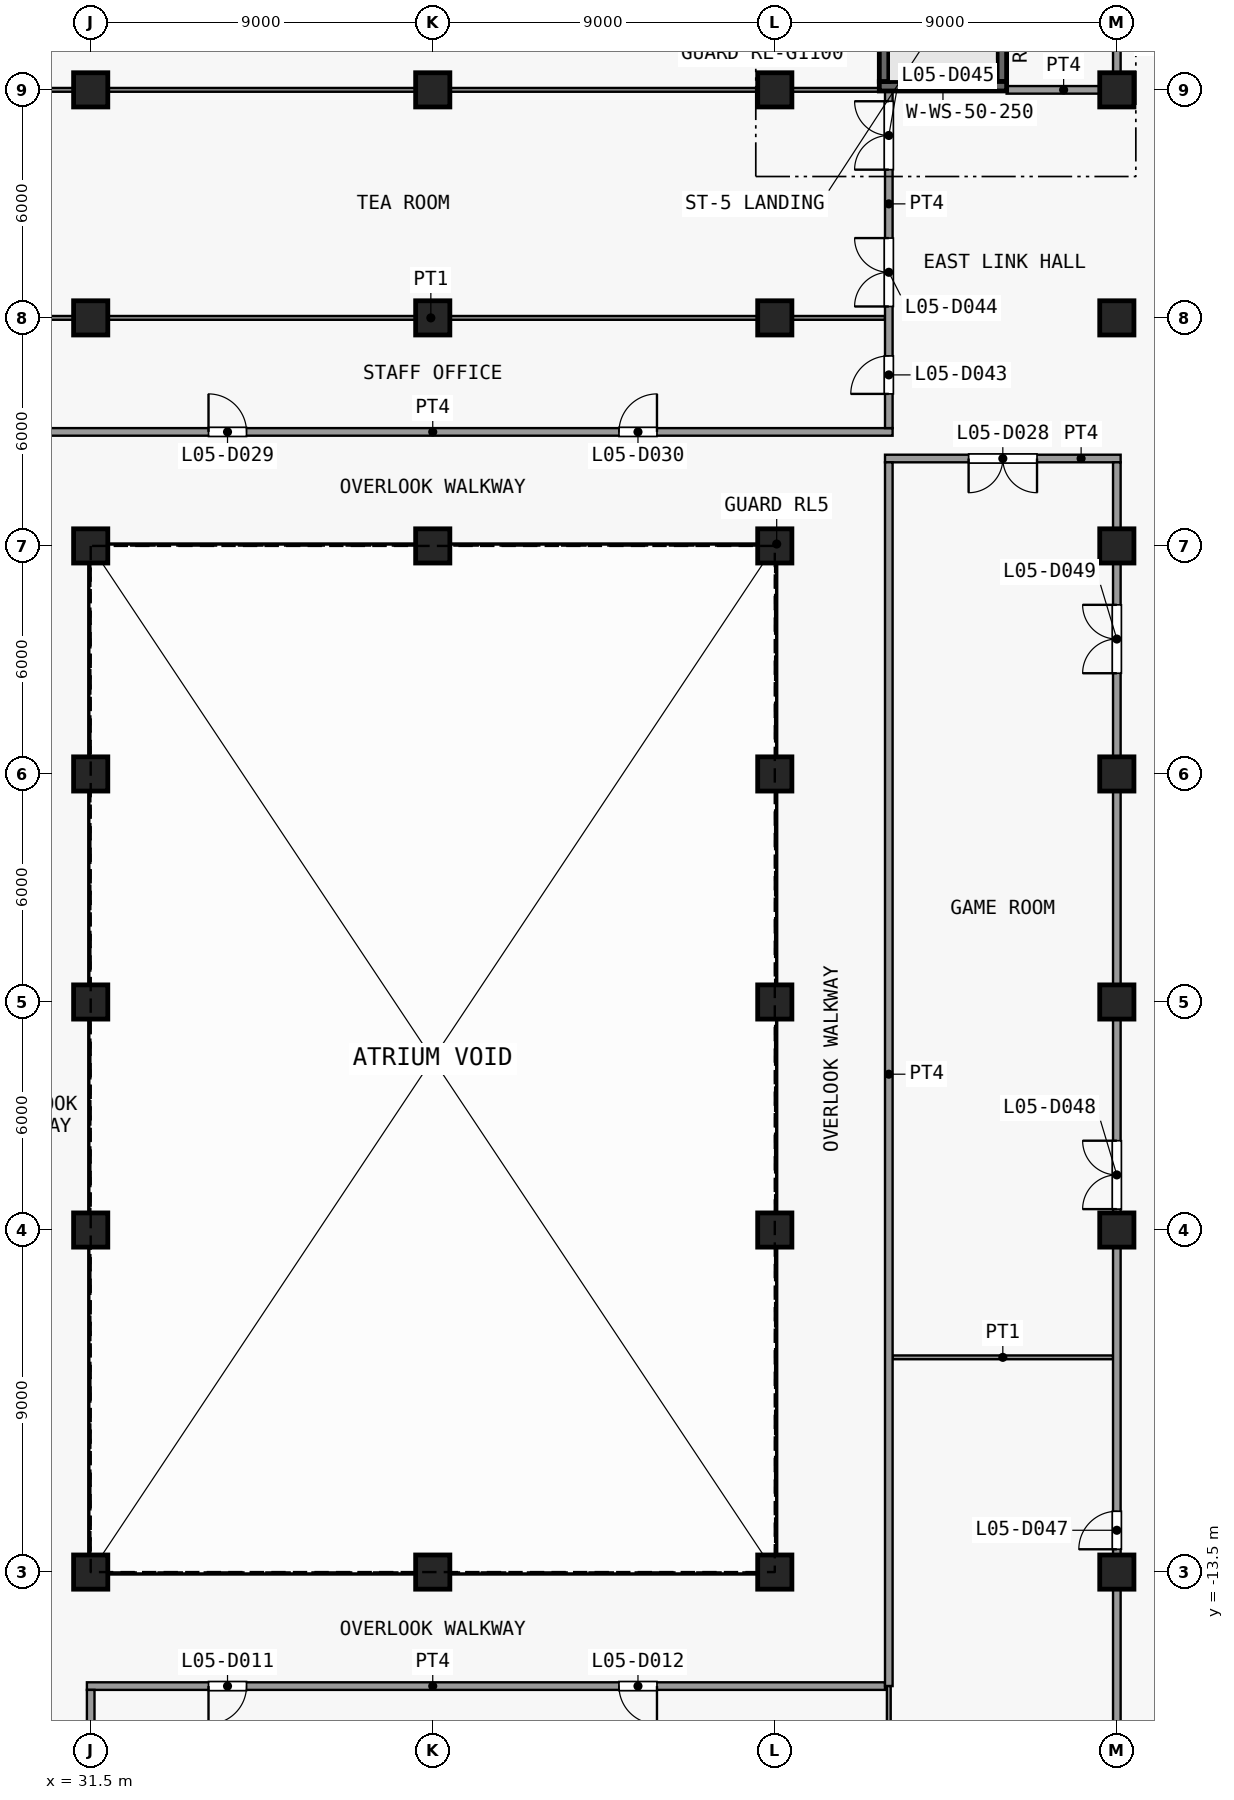
"""IFC4 building model, lengths in metres.
Left out: names, types, materials, properties, quantities, classifications, styles, units other than length and angle.
Written with IfcOpenShell. Run it as: python <this file> out.ifc"""

import sys

from ifc_helpers import new_model, si_unit, direction, frame, frame_2d, origin, origin_2d, place, context, subcontext, project, spatial, rectangle, extrude, element, fill, save


model = new_model("IFC4")
c1 = context("Model", 3, precision=1e-05, world=origin(), true_north=direction((0.0, 1.0)))
c2 = subcontext(c1, "Body", "Model", "MODEL_VIEW")
j1 = project(units=[si_unit("LENGTHUNIT", "METRE"), si_unit("PLANEANGLEUNIT", "RADIAN")], contexts=[c1])
p1 = place(None, origin())
s1 = spatial("IfcSite", under=j1, at=p1, CompositionType="ELEMENT")
p2 = place(p1, origin())
s2 = spatial("IfcBuilding", under=s1, at=p2, CompositionType="ELEMENT")
p3 = place(p2, frame((0.0, 0.0, 28.0)))
s3 = spatial("IfcBuildingStorey", under=s2, at=p3, CompositionType="ELEMENT", Elevation=28.0)
for number, where, z_axis, x_axis in (
    (1, (31.5, -13.5, 0.0), (0.0, 0.0, 1.0), (1.0, 0.0, 0.0)),
    (2, (31.5, -4.5, 0.0), (0.0, 0.0, 1.0), (1.0, 0.0, 0.0)),
    (3, (31.5, 1.5, 0.0), (0.0, 0.0, 1.0), (1.0, 0.0, 0.0)),
    (4, (31.5, 7.5, 0.0), (0.0, 0.0, 1.0), (1.0, 0.0, 0.0)),
    (5, (31.5, 13.5, 0.0), (0.0, 0.0, 1.0), (1.0, 0.0, 0.0)),
    (6, (31.5, 19.5, 0.0), (0.0, 0.0, 1.0), (1.0, 0.0, 0.0)),
    (7, (31.5, 25.5, 0.0), (0.0, 0.0, 1.0), (1.0, 0.0, 0.0)),
    (8, (40.5, -13.5, 0.0), (0.0, 0.0, 1.0), (1.0, 0.0, 0.0)),
    (9, (40.5, 13.5, 0.0), (0.0, 0.0, 1.0), (1.0, 0.0, 0.0)),
    (10, (40.5, 19.5, 0.0), (0.0, 0.0, 1.0), (1.0, 0.0, 0.0)),
    (11, (40.5, 25.5, 0.0), (0.0, 0.0, 1.0), (1.0, 0.0, 0.0)),
    (12, (49.5, -13.5, 0.0), (0.0, 0.0, 1.0), (1.0, 0.0, 0.0)),
    (13, (49.5, -4.5, 0.0), (0.0, 0.0, 1.0), (1.0, 0.0, 0.0)),
    (14, (49.5, 1.5, 0.0), (0.0, 0.0, 1.0), (1.0, 0.0, 0.0)),
    (15, (49.5, 7.5, 0.0), (0.0, 0.0, 1.0), (1.0, 0.0, 0.0)),
    (16, (49.5, 13.5, 0.0), (0.0, 0.0, 1.0), (1.0, 0.0, 0.0)),
    (17, (49.5, 19.5, 0.0), (0.0, 0.0, 1.0), (1.0, 0.0, 0.0)),
    (18, (49.5, 25.5, 0.0), (0.0, 0.0, 1.0), (1.0, 0.0, 0.0)),
    (19, (58.5, -13.5, 0.0), (0.0, 0.0, 1.0), (1.0, 0.0, 0.0)),
    (20, (58.5, -4.5, 0.0), (0.0, 0.0, 1.0), (1.0, 0.0, 0.0)),
    (21, (58.5, 1.5, 0.0), (0.0, 0.0, 1.0), (1.0, 0.0, 0.0)),
    (22, (58.5, 7.5, 0.0), (0.0, 0.0, 1.0), (1.0, 0.0, 0.0)),
    (23, (58.5, 13.5, 0.0), (0.0, 0.0, 1.0), (1.0, 0.0, 0.0)),
    (24, (58.5, 19.5, 0.0), (0.0, 0.0, 1.0), (1.0, 0.0, 0.0)),
    (25, (58.5, 25.5, 0.0), (0.0, 0.0, 1.0), (1.0, 0.0, 0.0)),
):
    element("IfcColumn", number, at=place(p3, frame(where, z_axis=z_axis, x_axis=x_axis)), inside=s3, PredefinedType="COLUMN", context=c2, shape_type="SweptSolid", body=[
        extrude(rectangle(XDim=0.9, YDim=0.9, at=origin_2d()), origin(), (0.0, 0.0, 1.0), 4.5),
    ])
for number, where, z_axis, x_axis in (
    (26, (52.375, 25.72, 0.0), (0.0, 0.0, 1.0), (0.0, 1.0, 0.0)),
    (27, (55.475, 25.72, 0.0), (0.0, 0.0, 1.0), (0.0, 1.0, 0.0)),
):
    element("IfcWall", number, at=place(p3, frame(where, z_axis=z_axis, x_axis=x_axis)), inside=s3, PredefinedType="SHEAR", context=c2, shape_type="SweptSolid", body=[
        extrude(rectangle(XDim=1.35, YDim=0.25, at=frame_2d((0.675, 0.0))), origin(), (0.0, 0.0, 1.0), 4.1),
    ])
p4 = place(p3, frame((52.25, 25.595, 0.0), z_axis=(0.0, 0.0, 1.0), x_axis=(1.0, 0.0, 0.0)))
e28 = element("IfcWall", 28, at=p4, inside=s3, PredefinedType="SHEAR", context=c2, shape_type="SweptSolid", body=[
    extrude(rectangle(XDim=3.35, YDim=0.25, at=frame_2d((1.675, 0.0))), origin(), (0.0, 0.0, 1.0), 4.1),
])
p5 = place(p3, frame((31.4, -16.5, 0.0), z_axis=(0.0, 0.0, 1.0), x_axis=(1.0, 0.0, 0.0)))
e29 = element("IfcWall", 29, at=p5, inside=s3, PredefinedType="PARTITIONING", context=c2, shape_type="SweptSolid", body=[
    extrude(rectangle(XDim=21.0, YDim=0.2, at=frame_2d((10.5, 0.0))), origin(), (0.0, 0.0, 1.0), 4.1),
])
p6 = place(p5, frame((3.2, 0.0, 0.0)))
e30 = element("IfcOpeningElement", 30, at=p6, cuts=e29, PredefinedType="OPENING", context=c2, shape_type="SweptSolid", body=[
    extrude(rectangle(XDim=1.0, YDim=2.1, at=frame_2d((0.5, 1.05))), frame((0.0, 0.11, 0.0), z_axis=(0.0, -1.0, 0.0), x_axis=(1.0, 0.0, 0.0)), (0.0, 0.0, 1.0), 0.22),
])
p7 = place(p5, frame((14.0, 0.0, 0.0)))
e31 = element("IfcOpeningElement", 31, at=p7, cuts=e29, PredefinedType="OPENING", context=c2, shape_type="SweptSolid", body=[
    extrude(rectangle(XDim=1.0, YDim=2.1, at=frame_2d((0.5, 1.05))), frame((0.0, 0.11, 0.0), z_axis=(0.0, -1.0, 0.0), x_axis=(1.0, 0.0, 0.0)), (0.0, 0.0, 1.0), 0.22),
])
p8 = place(p3, frame((52.6, -7.85, 0.0), z_axis=(0.0, 0.0, 1.0), x_axis=(1.0, 0.0, 0.0)))
e32 = element("IfcWall", 32, at=p8, inside=s3, PredefinedType="PARTITIONING", context=c2, shape_type="SweptSolid", body=[
    extrude(rectangle(XDim=5.8, YDim=0.1, at=frame_2d((2.9, 0.0))), origin(), (0.0, 0.0, 1.0), 4.1),
])
p9 = place(p3, frame((52.4, 15.8, 0.0), z_axis=(0.0, 0.0, 1.0), x_axis=(1.0, 0.0, 0.0)))
e33 = element("IfcWall", 33, at=p9, inside=s3, PredefinedType="PARTITIONING", context=c2, shape_type="SweptSolid", body=[
    extrude(rectangle(XDim=6.2, YDim=0.2, at=frame_2d((3.1, 0.0))), origin(), (0.0, 0.0, 1.0), 4.1),
])
p10 = place(p9, frame((2.2, 0.0, 0.0)))
e34 = element("IfcOpeningElement", 34, at=p10, cuts=e33, PredefinedType="OPENING", context=c2, shape_type="SweptSolid", body=[
    extrude(rectangle(XDim=1.8, YDim=2.1, at=frame_2d((0.9, 1.05))), frame((0.0, 0.11, 0.0), z_axis=(0.0, -1.0, 0.0), x_axis=(1.0, 0.0, 0.0)), (0.0, 0.0, 1.0), 0.22),
])
p11 = place(p3, frame((28.4, 16.5, 0.0), z_axis=(0.0, 0.0, 1.0), x_axis=(1.0, 0.0, 0.0)))
e35 = element("IfcWall", 35, at=p11, inside=s3, PredefinedType="PARTITIONING", context=c2, shape_type="SweptSolid", body=[
    extrude(rectangle(XDim=24.2, YDim=0.2, at=frame_2d((12.1, 0.0))), origin(), (0.0, 0.0, 1.0), 4.1),
])
p12 = place(p11, frame((6.2, 0.0, 0.0)))
e36 = element("IfcOpeningElement", 36, at=p12, cuts=e35, PredefinedType="OPENING", context=c2, shape_type="SweptSolid", body=[
    extrude(rectangle(XDim=1.0, YDim=2.1, at=frame_2d((0.5, 1.05))), frame((0.0, 0.11, 0.0), z_axis=(0.0, -1.0, 0.0), x_axis=(1.0, 0.0, 0.0)), (0.0, 0.0, 1.0), 0.22),
])
p13 = place(p11, frame((17.0, 0.0, 0.0)))
e37 = element("IfcOpeningElement", 37, at=p13, cuts=e35, PredefinedType="OPENING", context=c2, shape_type="SweptSolid", body=[
    extrude(rectangle(XDim=1.0, YDim=2.1, at=frame_2d((0.5, 1.05))), frame((0.0, 0.11, 0.0), z_axis=(0.0, -1.0, 0.0), x_axis=(1.0, 0.0, 0.0)), (0.0, 0.0, 1.0), 0.22),
])
p14 = place(p3, frame((28.5, 19.5, 0.0), z_axis=(0.0, 0.0, 1.0), x_axis=(1.0, 0.0, 0.0)))
e38 = element("IfcWall", 38, at=p14, inside=s3, PredefinedType="PARTITIONING", context=c2, shape_type="SweptSolid", body=[
    extrude(rectangle(XDim=23.9, YDim=0.1, at=frame_2d((11.95, 0.0))), origin(), (0.0, 0.0, 1.0), 4.1),
])
p15 = place(p3, frame((55.6, 25.5, 0.0), z_axis=(0.0, 0.0, 1.0), x_axis=(1.0, 0.0, 0.0)))
e39 = element("IfcWall", 39, at=p15, inside=s3, PredefinedType="PARTITIONING", context=c2, shape_type="SweptSolid", body=[
    extrude(rectangle(XDim=3.0, YDim=0.2, at=frame_2d((1.5, 0.0))), origin(), (0.0, 0.0, 1.0), 4.1),
])
p16 = place(p3, frame((-25.9, 25.5, 0.0), z_axis=(0.0, 0.0, 1.0), x_axis=(1.0, 0.0, 0.0)))
e40 = element("IfcWall", 40, at=p16, inside=s3, PredefinedType="PARTITIONING", context=c2, shape_type="SweptSolid", body=[
    extrude(rectangle(XDim=78.15, YDim=0.1, at=frame_2d((39.075, 0.0))), origin(), (0.0, 0.0, 1.0), 4.1),
])
p17 = place(p3, frame((31.5, -22.4, 0.0), z_axis=(0.0, 0.0, 1.0), x_axis=(0.0, 1.0, 0.0)))
e41 = element("IfcWall", 41, at=p17, inside=s3, PredefinedType="PARTITIONING", context=c2, shape_type="SweptSolid", body=[
    extrude(rectangle(XDim=5.8, YDim=0.2, at=frame_2d((2.9, 0.0))), origin(), (0.0, 0.0, 1.0), 4.1),
])
p18 = place(p17, frame((0.9, 0.0, 0.0)))
e42 = element("IfcOpeningElement", 42, at=p18, cuts=e41, PredefinedType="OPENING", context=c2, shape_type="SweptSolid", body=[
    extrude(rectangle(XDim=1.0, YDim=2.1, at=frame_2d((0.5, 1.05))), frame((0.0, 0.11, 0.0), z_axis=(0.0, -1.0, 0.0), x_axis=(1.0, 0.0, 0.0)), (0.0, 0.0, 1.0), 0.22),
])
p19 = place(p3, frame((52.5, -16.5, 0.0), z_axis=(0.0, 0.0, 1.0), x_axis=(0.0, 1.0, 0.0)))
e43 = element("IfcWall", 43, at=p19, inside=s3, PredefinedType="PARTITIONING", context=c2, shape_type="SweptSolid", body=[
    extrude(rectangle(XDim=32.2, YDim=0.2, at=frame_2d((16.1, 0.0))), origin(), (0.0, 0.0, 1.0), 4.1),
])
p20 = place(p3, frame((52.5, 16.6, 0.0), z_axis=(0.0, 0.0, 1.0), x_axis=(0.0, 1.0, 0.0)))
e44 = element("IfcWall", 44, at=p20, inside=s3, PredefinedType="PARTITIONING", context=c2, shape_type="SweptSolid", body=[
    extrude(rectangle(XDim=8.87, YDim=0.2, at=frame_2d((4.435, 0.0))), origin(), (0.0, 0.0, 1.0), 4.1),
])
p21 = place(p20, frame((0.9, 0.0, 0.0)))
e45 = element("IfcOpeningElement", 45, at=p21, cuts=e44, PredefinedType="OPENING", context=c2, shape_type="SweptSolid", body=[
    extrude(rectangle(XDim=1.0, YDim=2.1, at=frame_2d((0.5, 1.05))), frame((0.0, 0.11, 0.0), z_axis=(0.0, -1.0, 0.0), x_axis=(1.0, 0.0, 0.0)), (0.0, 0.0, 1.0), 0.22),
])
p22 = place(p20, frame((3.2, 0.0, 0.0)))
e46 = element("IfcOpeningElement", 46, at=p22, cuts=e44, PredefinedType="OPENING", context=c2, shape_type="SweptSolid", body=[
    extrude(rectangle(XDim=1.8, YDim=2.1, at=frame_2d((0.9, 1.05))), frame((0.0, 0.11, 0.0), z_axis=(0.0, -1.0, 0.0), x_axis=(1.0, 0.0, 0.0)), (0.0, 0.0, 1.0), 0.22),
])
p23 = place(p20, frame((6.8, 0.0, 0.0)))
e47 = element("IfcOpeningElement", 47, at=p23, cuts=e44, PredefinedType="OPENING", context=c2, shape_type="SweptSolid", body=[
    extrude(rectangle(XDim=1.8, YDim=2.1, at=frame_2d((0.9, 1.05))), frame((0.0, 0.11, 0.0), z_axis=(0.0, -1.0, 0.0), x_axis=(1.0, 0.0, 0.0)), (0.0, 0.0, 1.0), 0.22),
])
p24 = place(p3, frame((52.5, -25.47, 0.0), z_axis=(0.0, 0.0, 1.0), x_axis=(0.0, 1.0, 0.0)))
e48 = element("IfcWall", 48, at=p24, inside=s3, PredefinedType="PARTITIONING", context=c2, shape_type="SweptSolid", body=[
    extrude(rectangle(XDim=8.97, YDim=0.1, at=frame_2d((4.485, 0.0))), origin(), (0.0, 0.0, 1.0), 4.1),
])
p25 = place(p3, frame((58.5, -31.4, 0.0), z_axis=(0.0, 0.0, 1.0), x_axis=(0.0, 1.0, 0.0)))
e49 = element("IfcWall", 49, at=p25, inside=s3, PredefinedType="PARTITIONING", context=c2, shape_type="SweptSolid", body=[
    extrude(rectangle(XDim=47.1, YDim=0.2, at=frame_2d((23.55, 0.0))), origin(), (0.0, 0.0, 1.0), 4.1),
])
p26 = place(p25, frame((4.1, 0.0, 0.0)))
e50 = element("IfcOpeningElement", 50, at=p26, cuts=e49, PredefinedType="OPENING", context=c2, shape_type="SweptSolid", body=[
    extrude(rectangle(XDim=1.0, YDim=2.1, at=frame_2d((0.5, 1.05))), frame((0.0, 0.11, 0.0), z_axis=(0.0, -1.0, 0.0), x_axis=(1.0, 0.0, 0.0)), (0.0, 0.0, 1.0), 0.22),
])
p27 = place(p25, frame((18.5, 0.0, 0.0)))
e51 = element("IfcOpeningElement", 51, at=p27, cuts=e49, PredefinedType="OPENING", context=c2, shape_type="SweptSolid", body=[
    extrude(rectangle(XDim=1.0, YDim=2.1, at=frame_2d((0.5, 1.05))), frame((0.0, 0.11, 0.0), z_axis=(0.0, -1.0, 0.0), x_axis=(1.0, 0.0, 0.0)), (0.0, 0.0, 1.0), 0.22),
])
p28 = place(p25, frame((27.45, 0.0, 0.0)))
e52 = element("IfcOpeningElement", 52, at=p28, cuts=e49, PredefinedType="OPENING", context=c2, shape_type="SweptSolid", body=[
    extrude(rectangle(XDim=1.8, YDim=2.1, at=frame_2d((0.9, 1.05))), frame((0.0, 0.11, 0.0), z_axis=(0.0, -1.0, 0.0), x_axis=(1.0, 0.0, 0.0)), (0.0, 0.0, 1.0), 0.22),
])
p29 = place(p25, frame((41.55, 0.0, 0.0)))
e53 = element("IfcOpeningElement", 53, at=p29, cuts=e49, PredefinedType="OPENING", context=c2, shape_type="SweptSolid", body=[
    extrude(rectangle(XDim=1.8, YDim=2.1, at=frame_2d((0.9, 1.05))), frame((0.0, 0.11, 0.0), z_axis=(0.0, -1.0, 0.0), x_axis=(1.0, 0.0, 0.0)), (0.0, 0.0, 1.0), 0.22),
])
p30 = place(p3, frame((58.5, 25.6, 0.0), z_axis=(0.0, 0.0, 1.0), x_axis=(0.0, 1.0, 0.0)))
e54 = element("IfcWall", 54, at=p30, inside=s3, PredefinedType="PARTITIONING", context=c2, shape_type="SweptSolid", body=[
    extrude(rectangle(XDim=5.8, YDim=0.2, at=frame_2d((2.9, 0.0))), origin(), (0.0, 0.0, 1.0), 4.1),
])
p31 = place(p30, frame((2.4, 0.0, 0.0)))
e55 = element("IfcOpeningElement", 55, at=p31, cuts=e54, PredefinedType="OPENING", context=c2, shape_type="SweptSolid", body=[
    extrude(rectangle(XDim=1.0, YDim=2.1, at=frame_2d((0.5, 1.05))), frame((0.0, 0.11, 0.0), z_axis=(0.0, -1.0, 0.0), x_axis=(1.0, 0.0, 0.0)), (0.0, 0.0, 1.0), 0.22),
])
p32 = place(p6, origin())
e56 = element("IfcDoor", 56, at=p32, inside=s3, OperationType="SINGLE_SWING_LEFT", PredefinedType="DOOR", context=c2, shape_type="SweptSolid", body=[
    extrude(rectangle(XDim=1.0, YDim=2.1, at=frame_2d((0.5, 1.05))), frame((0.0, 0.025, 0.0), z_axis=(0.0, -1.0, 0.0), x_axis=(1.0, 0.0, 0.0)), (0.0, 0.0, 1.0), 0.05),
])
fill(e30, e56)
p33 = place(p7, origin())
e57 = element("IfcDoor", 57, at=p33, inside=s3, OperationType="SINGLE_SWING_RIGHT", PredefinedType="DOOR", context=c2, shape_type="SweptSolid", body=[
    extrude(rectangle(XDim=1.0, YDim=2.1, at=frame_2d((0.5, 1.05))), frame((0.0, 0.025, 0.0), z_axis=(0.0, -1.0, 0.0), x_axis=(1.0, 0.0, 0.0)), (0.0, 0.0, 1.0), 0.05),
])
fill(e31, e57)
p34 = place(p10, origin())
e58 = element("IfcDoor", 58, at=p34, inside=s3, OperationType="DOUBLE_DOOR_SINGLE_SWING", PredefinedType="DOOR", context=c2, shape_type="SweptSolid", body=[
    extrude(rectangle(XDim=1.8, YDim=2.1, at=frame_2d((0.9, 1.05))), frame((0.0, 0.025, 0.0), z_axis=(0.0, -1.0, 0.0), x_axis=(1.0, 0.0, 0.0)), (0.0, 0.0, 1.0), 0.05),
])
fill(e34, e58)
p35 = place(p12, origin())
e59 = element("IfcDoor", 59, at=p35, inside=s3, OperationType="SINGLE_SWING_RIGHT", PredefinedType="DOOR", context=c2, shape_type="SweptSolid", body=[
    extrude(rectangle(XDim=1.0, YDim=2.1, at=frame_2d((0.5, 1.05))), frame((0.0, 0.025, 0.0), z_axis=(0.0, -1.0, 0.0), x_axis=(1.0, 0.0, 0.0)), (0.0, 0.0, 1.0), 0.05),
])
fill(e36, e59)
p36 = place(p13, origin())
e60 = element("IfcDoor", 60, at=p36, inside=s3, OperationType="SINGLE_SWING_LEFT", PredefinedType="DOOR", context=c2, shape_type="SweptSolid", body=[
    extrude(rectangle(XDim=1.0, YDim=2.1, at=frame_2d((0.5, 1.05))), frame((0.0, 0.025, 0.0), z_axis=(0.0, -1.0, 0.0), x_axis=(1.0, 0.0, 0.0)), (0.0, 0.0, 1.0), 0.05),
])
fill(e37, e60)
p37 = place(p21, origin())
e61 = element("IfcDoor", 61, at=p37, inside=s3, OperationType="SINGLE_SWING_RIGHT", PredefinedType="DOOR", context=c2, shape_type="SweptSolid", body=[
    extrude(rectangle(XDim=1.0, YDim=2.1, at=frame_2d((0.5, 1.05))), frame((0.0, 0.025, 0.0), z_axis=(0.0, -1.0, 0.0), x_axis=(1.0, 0.0, 0.0)), (0.0, 0.0, 1.0), 0.05),
])
fill(e45, e61)
p38 = place(p22, origin())
e62 = element("IfcDoor", 62, at=p38, inside=s3, OperationType="DOUBLE_DOOR_SINGLE_SWING", PredefinedType="DOOR", context=c2, shape_type="SweptSolid", body=[
    extrude(rectangle(XDim=1.8, YDim=2.1, at=frame_2d((0.9, 1.05))), frame((0.0, 0.025, 0.0), z_axis=(0.0, -1.0, 0.0), x_axis=(1.0, 0.0, 0.0)), (0.0, 0.0, 1.0), 0.05),
])
fill(e46, e62)
p39 = place(p23, origin())
e63 = element("IfcDoor", 63, at=p39, inside=s3, OperationType="DOUBLE_DOOR_SINGLE_SWING", PredefinedType="DOOR", context=c2, shape_type="SweptSolid", body=[
    extrude(rectangle(XDim=1.8, YDim=2.1, at=frame_2d((0.9, 1.05))), frame((0.0, 0.025, 0.0), z_axis=(0.0, -1.0, 0.0), x_axis=(1.0, 0.0, 0.0)), (0.0, 0.0, 1.0), 0.05),
])
fill(e47, e63)
p40 = place(p27, origin())
e64 = element("IfcDoor", 64, at=p40, inside=s3, OperationType="SINGLE_SWING_RIGHT", PredefinedType="DOOR", context=c2, shape_type="SweptSolid", body=[
    extrude(rectangle(XDim=1.0, YDim=2.1, at=frame_2d((0.5, 1.05))), frame((0.0, 0.025, 0.0), z_axis=(0.0, -1.0, 0.0), x_axis=(1.0, 0.0, 0.0)), (0.0, 0.0, 1.0), 0.05),
])
fill(e51, e64)
p41 = place(p28, origin())
e65 = element("IfcDoor", 65, at=p41, inside=s3, OperationType="DOUBLE_DOOR_SINGLE_SWING", PredefinedType="DOOR", context=c2, shape_type="SweptSolid", body=[
    extrude(rectangle(XDim=1.8, YDim=2.1, at=frame_2d((0.9, 1.05))), frame((0.0, 0.025, 0.0), z_axis=(0.0, -1.0, 0.0), x_axis=(1.0, 0.0, 0.0)), (0.0, 0.0, 1.0), 0.05),
])
fill(e52, e65)
p42 = place(p29, origin())
e66 = element("IfcDoor", 66, at=p42, inside=s3, OperationType="DOUBLE_DOOR_SINGLE_SWING", PredefinedType="DOOR", context=c2, shape_type="SweptSolid", body=[
    extrude(rectangle(XDim=1.8, YDim=2.1, at=frame_2d((0.9, 1.05))), frame((0.0, 0.025, 0.0), z_axis=(0.0, -1.0, 0.0), x_axis=(1.0, 0.0, 0.0)), (0.0, 0.0, 1.0), 0.05),
])
fill(e53, e66)
save(model, sys.argv[1])
